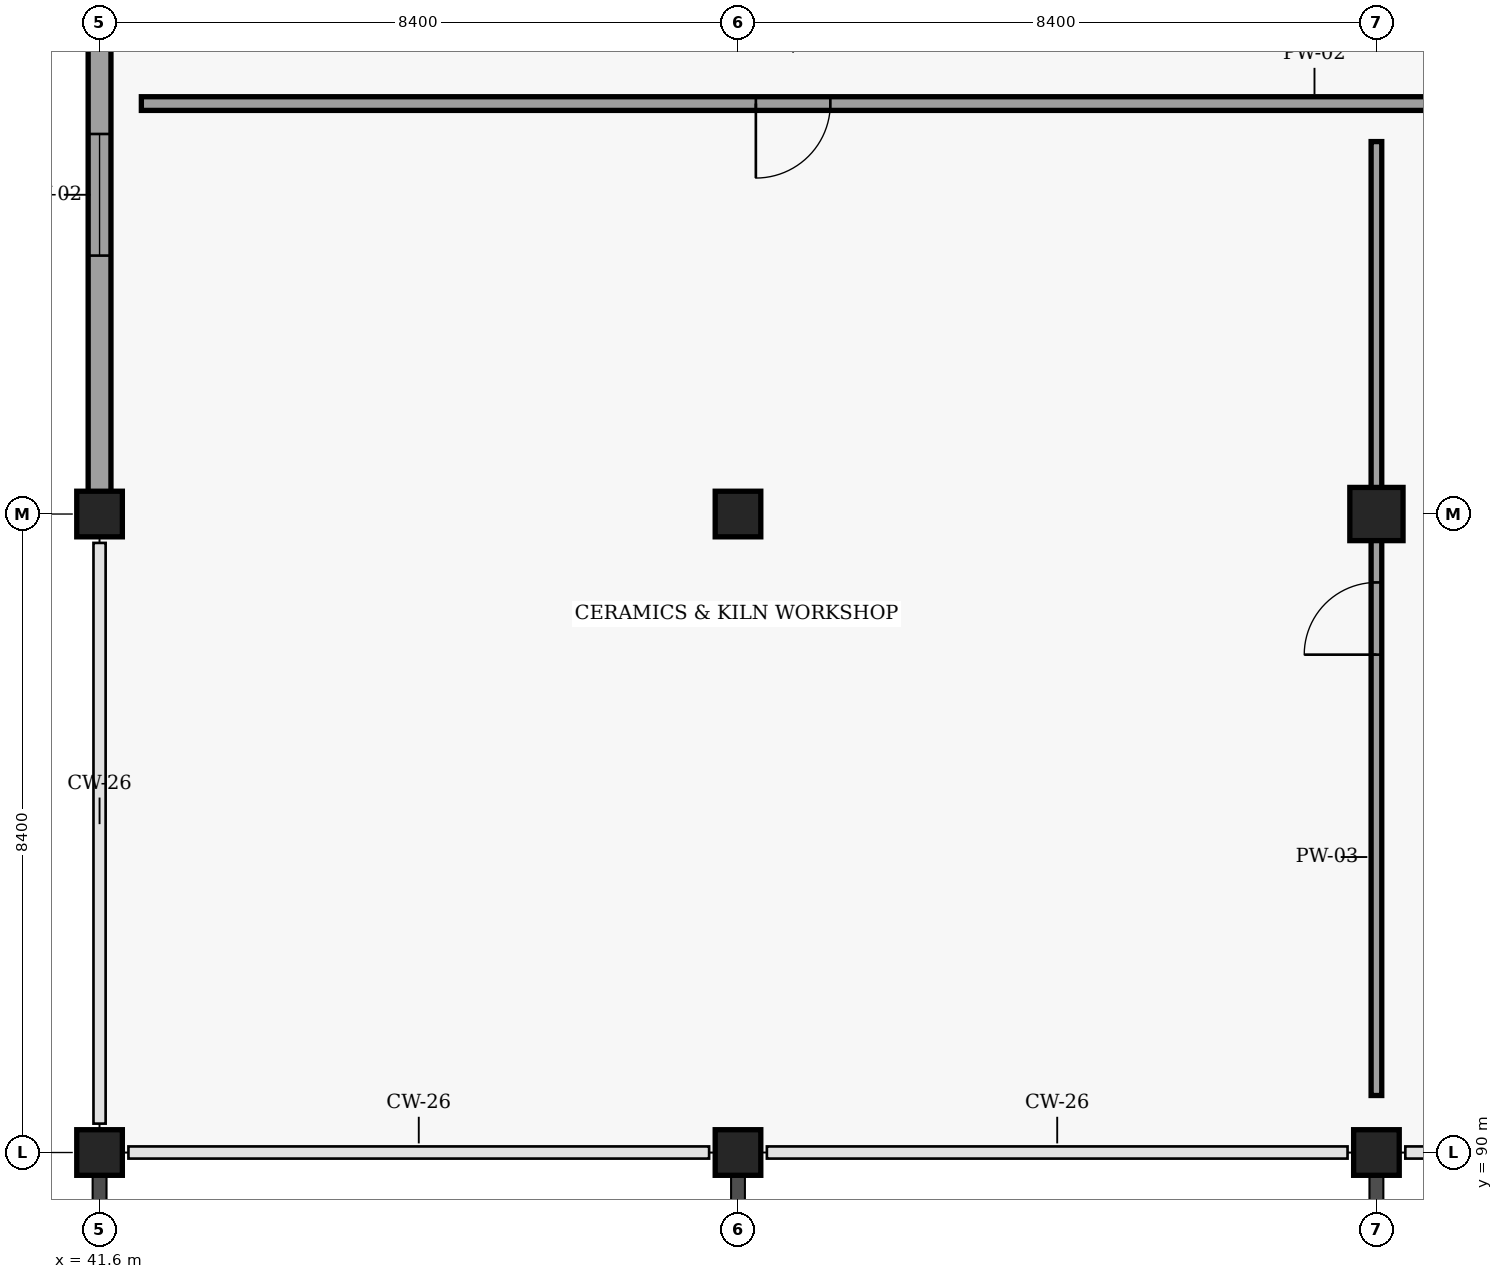
"""IFC4 building model, lengths in metres.
Left out: names, types, materials, properties, quantities, classifications, styles, units other than length and angle.
Written with IfcOpenShell. Run it as: python <this file> out.ifc"""

import sys

from ifc_helpers import new_model, si_unit, direction, frame, frame_2d, origin, origin_2d, place, context, subcontext, project, spatial, rectangle, extrude, element, fill, save


model = new_model("IFC4")
c1 = context("Model", 3, precision=1e-05, world=origin(), true_north=direction((0.0, 1.0)))
c2 = subcontext(c1, "Body", "Model", "MODEL_VIEW")
j1 = project(units=[si_unit("LENGTHUNIT", "METRE"), si_unit("PLANEANGLEUNIT", "RADIAN")], contexts=[c1])
p1 = place(None, origin())
s1 = spatial("IfcSite", under=j1, at=p1, CompositionType="ELEMENT")
p2 = place(p1, origin())
s2 = spatial("IfcBuilding", under=s1, at=p2, CompositionType="ELEMENT")
p3 = place(p2, frame((0.0, 0.0, 4.8)))
s3 = spatial("IfcBuildingStorey", under=s2, at=p3, CompositionType="ELEMENT", Elevation=4.8)
for number, where, z_axis, x_axis in (
    (1, (41.6, 90.0, 0.0), (0.0, 0.0, 1.0), (1.0, 0.0, 0.0)),
    (2, (41.6, 98.4, 0.0), (0.0, 0.0, 1.0), (1.0, 0.0, 0.0)),
    (3, (50.0, 90.0, 0.0), (0.0, 0.0, 1.0), (1.0, 0.0, 0.0)),
    (4, (50.0, 98.4, 0.0), (0.0, 0.0, 1.0), (1.0, 0.0, 0.0)),
    (5, (58.4, 90.0, 0.0), (0.0, 0.0, 1.0), (1.0, 0.0, 0.0)),
):
    element("IfcColumn", number, at=place(p3, frame(where, z_axis=z_axis, x_axis=x_axis)), inside=s3, PredefinedType="COLUMN", context=c2, shape_type="SweptSolid", body=[
        extrude(rectangle(XDim=0.6, YDim=0.6, at=origin_2d()), origin(), (0.0, 0.0, 1.0), 4.2),
    ])
p4 = place(p3, frame((58.4, 98.4, 0.0), z_axis=(0.0, 0.0, 1.0), x_axis=(1.0, 0.0, 0.0)))
e6 = element("IfcColumn", 6, at=p4, inside=s3, PredefinedType="COLUMN", context=c2, shape_type="SweptSolid", body=[
    extrude(rectangle(XDim=0.7, YDim=0.7, at=origin_2d()), origin(), (0.0, 0.0, 1.0), 4.2),
])
p5 = place(p3, frame((41.6, 98.5, 0.0), z_axis=(0.0, 0.0, 1.0), x_axis=(0.0, 1.0, 0.0)))
e7 = element("IfcWall", 7, at=p5, inside=s3, PredefinedType="SOLIDWALL", context=c2, shape_type="SweptSolid", body=[
    extrude(rectangle(XDim=8.2, YDim=0.3, at=frame_2d((4.1, 0.0))), origin(), (0.0, 0.0, 1.0), 3.495),
])
p6 = place(p5, frame((3.3, 0.0, 0.9)))
e8 = element("IfcOpeningElement", 8, at=p6, cuts=e7, PredefinedType="OPENING", context=c2, shape_type="SweptSolid", body=[
    extrude(rectangle(XDim=1.6, YDim=2.1, at=frame_2d((0.8, 1.05))), frame((0.0, 0.16, 0.0), z_axis=(0.0, -1.0, 0.0), x_axis=(1.0, 0.0, 0.0)), (0.0, 0.0, 1.0), 0.32),
])
p7 = place(p3, frame((42.15, 103.8, 0.0), z_axis=(0.0, 0.0, 1.0), x_axis=(1.0, 0.0, 0.0)))
e9 = element("IfcWall", 9, at=p7, inside=s3, PredefinedType="PARTITIONING", context=c2, shape_type="SweptSolid", body=[
    extrude(rectangle(XDim=102.9, YDim=0.18, at=frame_2d((51.45, 0.0))), origin(), (0.0, 0.0, 1.0), 3.094),
])
p8 = place(p7, frame((8.085, 0.0, 0.0)))
e10 = element("IfcOpeningElement", 10, at=p8, cuts=e9, PredefinedType="OPENING", context=c2, shape_type="SweptSolid", body=[
    extrude(rectangle(XDim=0.98, YDim=2.12, at=frame_2d((0.49, 1.06))), frame((0.0, 0.1, 0.0), z_axis=(0.0, -1.0, 0.0), x_axis=(1.0, 0.0, 0.0)), (0.0, 0.0, 1.0), 0.2),
])
p9 = place(p7, frame((17.125, 0.0, 0.0)))
e11 = element("IfcOpeningElement", 11, at=p9, cuts=e9, PredefinedType="OPENING", context=c2, shape_type="SweptSolid", body=[
    extrude(rectangle(XDim=0.95, YDim=2.12, at=frame_2d((0.475, 1.06))), frame((0.0, 0.1, 0.0), z_axis=(0.0, -1.0, 0.0), x_axis=(1.0, 0.0, 0.0)), (0.0, 0.0, 1.0), 0.2),
])
p10 = place(p7, frame((25.265, 0.0, 0.0)))
e12 = element("IfcOpeningElement", 12, at=p10, cuts=e9, PredefinedType="OPENING", context=c2, shape_type="SweptSolid", body=[
    extrude(rectangle(XDim=0.92, YDim=2.1, at=frame_2d((0.46, 1.05))), frame((0.0, 0.1, 0.0), z_axis=(0.0, -1.0, 0.0), x_axis=(1.0, 0.0, 0.0)), (0.0, 0.0, 1.0), 0.2),
])
p11 = place(p7, frame((34.27, 0.0, 0.0)))
e13 = element("IfcOpeningElement", 13, at=p11, cuts=e9, PredefinedType="OPENING", context=c2, shape_type="SweptSolid", body=[
    extrude(rectangle(XDim=0.96, YDim=2.08, at=frame_2d((0.48, 1.04))), frame((0.0, 0.1, 0.0), z_axis=(0.0, -1.0, 0.0), x_axis=(1.0, 0.0, 0.0)), (0.0, 0.0, 1.0), 0.2),
])
p12 = place(p7, frame((42.425, 0.0, 0.0)))
e14 = element("IfcOpeningElement", 14, at=p12, cuts=e9, PredefinedType="OPENING", context=c2, shape_type="SweptSolid", body=[
    extrude(rectangle(XDim=0.9, YDim=2.06, at=frame_2d((0.45, 1.03))), frame((0.0, 0.1, 0.0), z_axis=(0.0, -1.0, 0.0), x_axis=(1.0, 0.0, 0.0)), (0.0, 0.0, 1.0), 0.2),
])
p13 = place(p7, frame((51.76, 0.0, 0.0)))
e15 = element("IfcOpeningElement", 15, at=p13, cuts=e9, PredefinedType="OPENING", context=c2, shape_type="SweptSolid", body=[
    extrude(rectangle(XDim=1.18, YDim=2.18, at=frame_2d((0.59, 1.09))), frame((0.0, 0.1, 0.0), z_axis=(0.0, -1.0, 0.0), x_axis=(1.0, 0.0, 0.0)), (0.0, 0.0, 1.0), 0.2),
])
p14 = place(p7, frame((59.375, 0.0, 0.0)))
e16 = element("IfcOpeningElement", 16, at=p14, cuts=e9, PredefinedType="OPENING", context=c2, shape_type="SweptSolid", body=[
    extrude(rectangle(XDim=1.3, YDim=2.2, at=frame_2d((0.65, 1.1))), frame((0.0, 0.1, 0.0), z_axis=(0.0, -1.0, 0.0), x_axis=(1.0, 0.0, 0.0)), (0.0, 0.0, 1.0), 0.2),
])
p15 = place(p7, frame((69.2, 0.0, 0.0)))
e17 = element("IfcOpeningElement", 17, at=p15, cuts=e9, PredefinedType="OPENING", context=c2, shape_type="SweptSolid", body=[
    extrude(rectangle(XDim=1.5, YDim=2.25, at=frame_2d((0.75, 1.125))), frame((0.0, 0.1, 0.0), z_axis=(0.0, -1.0, 0.0), x_axis=(1.0, 0.0, 0.0)), (0.0, 0.0, 1.0), 0.2),
])
p16 = place(p7, frame((76.555, 0.0, 0.0)))
e18 = element("IfcOpeningElement", 18, at=p16, cuts=e9, PredefinedType="OPENING", context=c2, shape_type="SweptSolid", body=[
    extrude(rectangle(XDim=1.24, YDim=2.2, at=frame_2d((0.62, 1.1))), frame((0.0, 0.1, 0.0), z_axis=(0.0, -1.0, 0.0), x_axis=(1.0, 0.0, 0.0)), (0.0, 0.0, 1.0), 0.2),
])
p17 = place(p7, frame((86.87, 0.0, 0.0)))
e19 = element("IfcOpeningElement", 19, at=p17, cuts=e9, PredefinedType="OPENING", context=c2, shape_type="SweptSolid", body=[
    extrude(rectangle(XDim=1.36, YDim=2.22, at=frame_2d((0.68, 1.11))), frame((0.0, 0.1, 0.0), z_axis=(0.0, -1.0, 0.0), x_axis=(1.0, 0.0, 0.0)), (0.0, 0.0, 1.0), 0.2),
])
p18 = place(p7, frame((93.485, 0.0, 0.0)))
e20 = element("IfcOpeningElement", 20, at=p18, cuts=e9, PredefinedType="OPENING", context=c2, shape_type="SweptSolid", body=[
    extrude(rectangle(XDim=1.68, YDim=2.26, at=frame_2d((0.84, 1.13))), frame((0.0, 0.1, 0.0), z_axis=(0.0, -1.0, 0.0), x_axis=(1.0, 0.0, 0.0)), (0.0, 0.0, 1.0), 0.2),
])
p19 = place(p3, frame((58.4, 90.75, 0.0), z_axis=(0.0, 0.0, 1.0), x_axis=(0.0, 1.0, 0.0)))
e21 = element("IfcWall", 21, at=p19, inside=s3, PredefinedType="PARTITIONING", context=c2, shape_type="SweptSolid", body=[
    extrude(rectangle(XDim=12.55, YDim=0.14, at=frame_2d((6.275, 0.0))), origin(), (0.0, 0.0, 1.0), 3.145),
])
p20 = place(p19, frame((5.8, 0.0, 0.0)))
e22 = element("IfcOpeningElement", 22, at=p20, cuts=e21, PredefinedType="OPENING", context=c2, shape_type="SweptSolid", body=[
    extrude(rectangle(XDim=0.95, YDim=2.12, at=frame_2d((0.475, 1.06))), frame((0.0, 0.08, 0.0), z_axis=(0.0, -1.0, 0.0), x_axis=(1.0, 0.0, 0.0)), (0.0, 0.0, 1.0), 0.16),
])
p21 = place(p6, origin())
e23 = element("IfcWindow", 23, at=p21, inside=s3, PartitioningType="SINGLE_PANEL", PredefinedType="WINDOW", context=c2, shape_type="SweptSolid", body=[
    extrude(rectangle(XDim=1.6, YDim=2.1, at=frame_2d((0.8, 1.05))), frame((0.0, 0.03, 0.0), z_axis=(0.0, -1.0, 0.0), x_axis=(1.0, 0.0, 0.0)), (0.0, 0.0, 1.0), 0.06),
])
fill(e8, e23)
p22 = place(p8, origin())
e24 = element("IfcDoor", 24, at=p22, inside=s3, OperationType="SINGLE_SWING_RIGHT", PredefinedType="DOOR", context=c2, shape_type="SweptSolid", body=[
    extrude(rectangle(XDim=0.98, YDim=2.12, at=frame_2d((0.49, 1.06))), frame((0.0, 0.025, 0.0), z_axis=(0.0, -1.0, 0.0), x_axis=(1.0, 0.0, 0.0)), (0.0, 0.0, 1.0), 0.05),
])
fill(e10, e24)
p23 = place(p20, origin())
e25 = element("IfcDoor", 25, at=p23, inside=s3, OperationType="SINGLE_SWING_LEFT", PredefinedType="DOOR", context=c2, shape_type="SweptSolid", body=[
    extrude(rectangle(XDim=0.95, YDim=2.12, at=frame_2d((0.475, 1.06))), frame((0.0, 0.025, 0.0), z_axis=(0.0, -1.0, 0.0), x_axis=(1.0, 0.0, 0.0)), (0.0, 0.0, 1.0), 0.05),
])
fill(e22, e25)
save(model, sys.argv[1])
